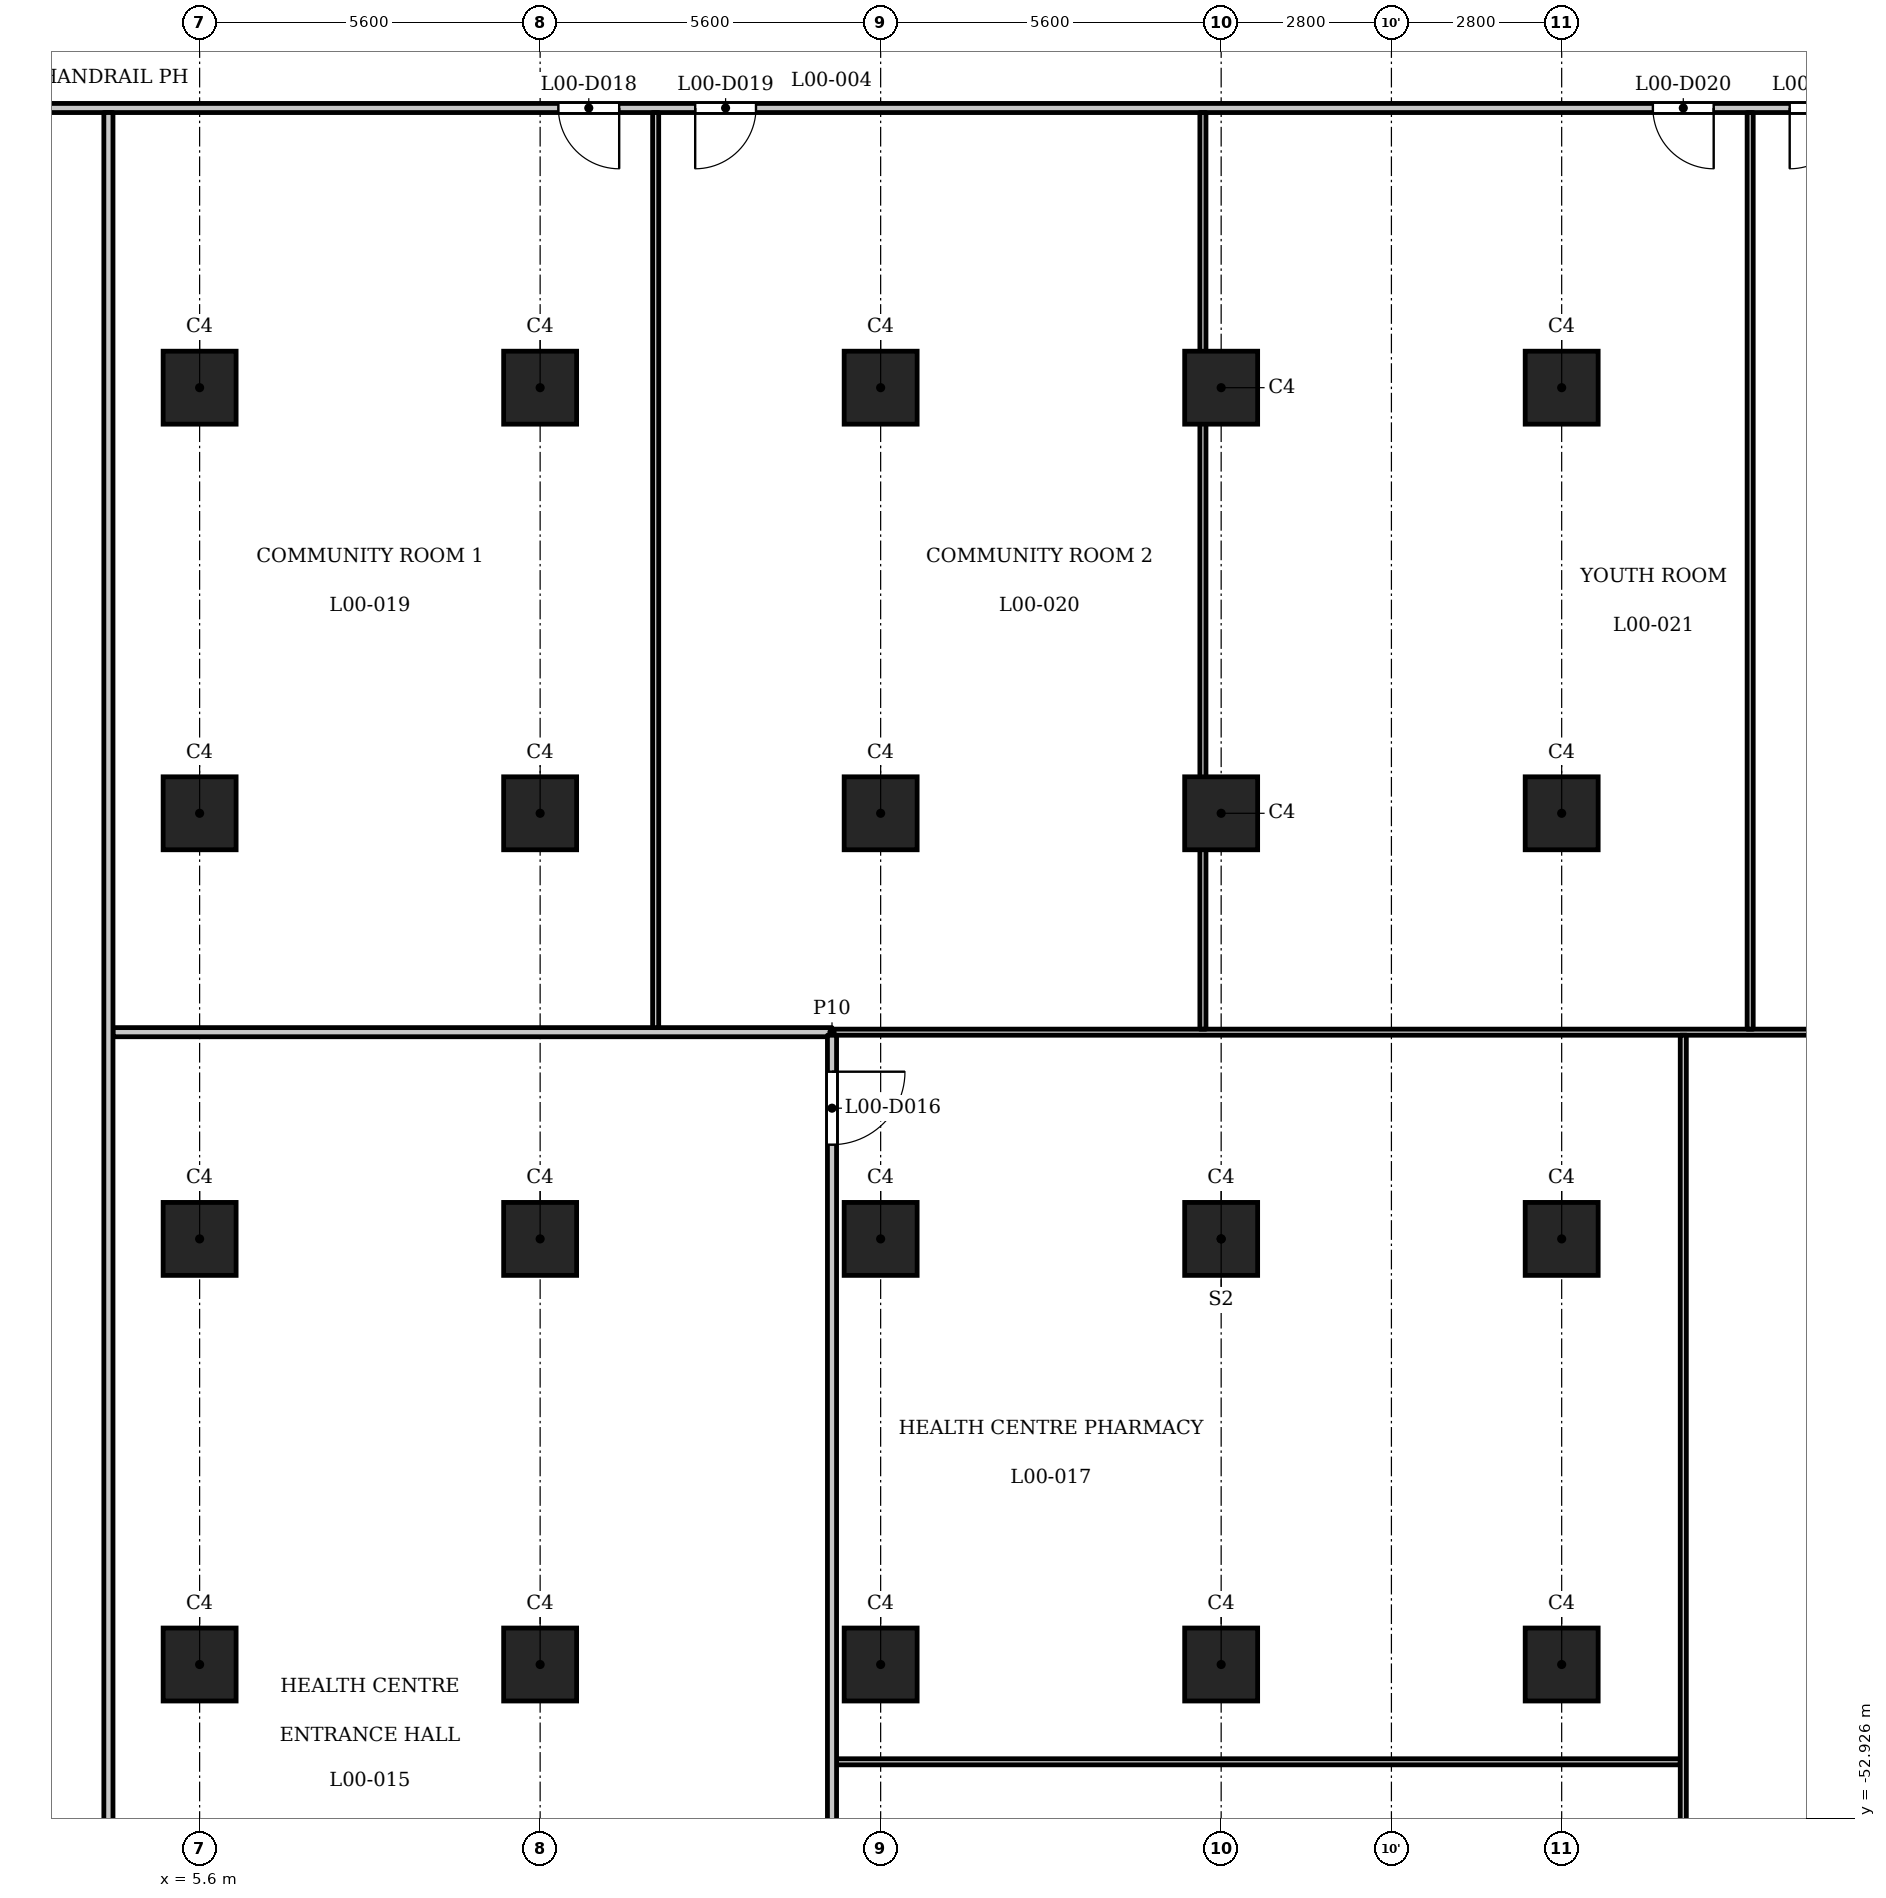
"""IFC4 building model, lengths in metres.
Left out: names, types, materials, properties, quantities, classifications, styles, units other than length and angle.
Written with IfcOpenShell. Run it as: python <this file> out.ifc"""

import sys

from ifc_helpers import new_model, si_unit, direction, frame, frame_2d, origin, origin_2d, place, context, subcontext, project, spatial, rectangle, circle, extrude, element, fill, save


model = new_model("IFC4")
c1 = context("Model", 3, precision=1e-05, world=origin(), true_north=direction((0.0, 1.0)))
c2 = subcontext(c1, "Body", "Model", "MODEL_VIEW")
j1 = project(units=[si_unit("LENGTHUNIT", "METRE"), si_unit("PLANEANGLEUNIT", "RADIAN")], contexts=[c1])
p1 = place(None, origin())
s1 = spatial("IfcSite", under=j1, at=p1, CompositionType="ELEMENT")
p2 = place(p1, origin())
s2 = spatial("IfcBuilding", under=s1, at=p2, CompositionType="ELEMENT")
p3 = place(p2, origin())
s3 = spatial("IfcBuildingStorey", under=s2, at=p3, CompositionType="ELEMENT", Elevation=0.0)
for number, where, z_axis, x_axis in (
    (1, (5.6, -29.4, 0.0), (0.0, 0.0, 1.0), (1.0, 0.0, 0.0)),
    (2, (11.2, -29.4, 0.0), (0.0, 0.0, 1.0), (1.0, 0.0, 0.0)),
    (3, (16.8, -29.4, 0.0), (0.0, 0.0, 1.0), (1.0, 0.0, 0.0)),
    (4, (22.4, -29.4, 0.0), (0.0, 0.0, 1.0), (1.0, 0.0, 0.0)),
    (5, (28.0, -29.4, 0.0), (0.0, 0.0, 1.0), (1.0, 0.0, 0.0)),
    (6, (5.6, -36.4, 0.0), (0.0, 0.0, 1.0), (1.0, 0.0, 0.0)),
    (7, (11.2, -36.4, 0.0), (0.0, 0.0, 1.0), (1.0, 0.0, 0.0)),
    (8, (16.8, -36.4, 0.0), (0.0, 0.0, 1.0), (1.0, 0.0, 0.0)),
    (9, (22.4, -36.4, 0.0), (0.0, 0.0, 1.0), (1.0, 0.0, 0.0)),
    (10, (28.0, -36.4, 0.0), (0.0, 0.0, 1.0), (1.0, 0.0, 0.0)),
    (11, (5.6, -43.4, 0.0), (0.0, 0.0, 1.0), (1.0, 0.0, 0.0)),
    (12, (11.2, -43.4, 0.0), (0.0, 0.0, 1.0), (1.0, 0.0, 0.0)),
    (13, (16.8, -43.4, 0.0), (0.0, 0.0, 1.0), (1.0, 0.0, 0.0)),
    (14, (22.4, -43.4, 0.0), (0.0, 0.0, 1.0), (1.0, 0.0, 0.0)),
    (15, (28.0, -43.4, 0.0), (0.0, 0.0, 1.0), (1.0, 0.0, 0.0)),
    (16, (5.6, -50.4, 0.0), (0.0, 0.0, 1.0), (1.0, 0.0, 0.0)),
    (17, (11.2, -50.4, 0.0), (0.0, 0.0, 1.0), (1.0, 0.0, 0.0)),
    (18, (16.8, -50.4, 0.0), (0.0, 0.0, 1.0), (1.0, 0.0, 0.0)),
    (19, (22.4, -50.4, 0.0), (0.0, 0.0, 1.0), (1.0, 0.0, 0.0)),
    (20, (28.0, -50.4, 0.0), (0.0, 0.0, 1.0), (1.0, 0.0, 0.0)),
):
    element("IfcColumn", number, at=place(p3, frame(where, z_axis=z_axis, x_axis=x_axis)), inside=s3, PredefinedType="COLUMN", context=c2, shape_type="SweptSolid", body=[
        extrude(circle(Radius=0.6, at=origin_2d()), origin(), (0.0, 0.0, 1.0), 6.5),
    ])
p4 = place(p3, frame((16.075, -52.0, 0.0), z_axis=(0.0, 0.0, 1.0), x_axis=(1.0, 0.0, 0.0)))
e21 = element("IfcWall", 21, at=p4, inside=s3, PredefinedType="PARTITIONING", context=c2, shape_type="SweptSolid", body=[
    extrude(rectangle(XDim=13.875, YDim=0.1, at=frame_2d((6.938, 0.0))), origin(), (0.0, 0.0, 1.0), 6.15),
])
p5 = place(p3, frame((16.0, -40.0, 0.0), z_axis=(0.0, 0.0, 1.0), x_axis=(1.0, 0.0, 0.0)))
e22 = element("IfcWall", 22, at=p5, inside=s3, PredefinedType="PARTITIONING", context=c2, shape_type="SweptSolid", body=[
    extrude(rectangle(XDim=28.618, YDim=0.1, at=frame_2d((14.309, 0.0))), origin(), (0.0, 0.0, 1.0), 6.15),
])
p6 = place(p3, frame((4.175, -40.0, 0.0), z_axis=(0.0, 0.0, 1.0), x_axis=(1.0, 0.0, 0.0)))
e23 = element("IfcWall", 23, at=p6, inside=s3, PredefinedType="PARTITIONING", context=c2, shape_type="SweptSolid", body=[
    extrude(rectangle(XDim=11.825, YDim=0.15, at=frame_2d((5.913, 0.0))), origin(), (0.0, 0.0, 1.0), 6.15),
])
p7 = place(p3, frame((2.05, -24.8, 0.0), z_axis=(0.0, 0.0, 1.0), x_axis=(1.0, 0.0, 0.0)))
e24 = element("IfcWall", 24, at=p7, inside=s3, PredefinedType="PARTITIONING", context=c2, shape_type="SweptSolid", body=[
    extrude(rectangle(XDim=34.95, YDim=0.15, at=frame_2d((17.475, 0.0))), origin(), (0.0, 0.0, 1.0), 6.15),
])
p8 = place(p7, frame((9.45, 0.0, 0.0)))
e25 = element("IfcOpeningElement", 25, at=p8, cuts=e24, PredefinedType="OPENING", context=c2, shape_type="SweptSolid", body=[
    extrude(rectangle(XDim=1.0, YDim=2.1, at=frame_2d((0.5, 1.05))), frame((0.0, 0.085, 0.0), z_axis=(0.0, -1.0, 0.0), x_axis=(1.0, 0.0, 0.0)), (0.0, 0.0, 1.0), 0.17),
])
p9 = place(p7, frame((11.7, 0.0, 0.0)))
e26 = element("IfcOpeningElement", 26, at=p9, cuts=e24, PredefinedType="OPENING", context=c2, shape_type="SweptSolid", body=[
    extrude(rectangle(XDim=1.0, YDim=2.1, at=frame_2d((0.5, 1.05))), frame((0.0, 0.085, 0.0), z_axis=(0.0, -1.0, 0.0), x_axis=(1.0, 0.0, 0.0)), (0.0, 0.0, 1.0), 0.17),
])
p10 = place(p7, frame((27.45, 0.0, 0.0)))
e27 = element("IfcOpeningElement", 27, at=p10, cuts=e24, PredefinedType="OPENING", context=c2, shape_type="SweptSolid", body=[
    extrude(rectangle(XDim=1.0, YDim=2.1, at=frame_2d((0.5, 1.05))), frame((0.0, 0.085, 0.0), z_axis=(0.0, -1.0, 0.0), x_axis=(1.0, 0.0, 0.0)), (0.0, 0.0, 1.0), 0.17),
])
p11 = place(p7, frame((29.7, 0.0, 0.0)))
e28 = element("IfcOpeningElement", 28, at=p11, cuts=e24, PredefinedType="OPENING", context=c2, shape_type="SweptSolid", body=[
    extrude(rectangle(XDim=1.0, YDim=2.1, at=frame_2d((0.5, 1.05))), frame((0.0, 0.085, 0.0), z_axis=(0.0, -1.0, 0.0), x_axis=(1.0, 0.0, 0.0)), (0.0, 0.0, 1.0), 0.17),
])
p12 = place(p3, frame((4.1, -64.08, 0.0), z_axis=(0.0, 0.0, 1.0), x_axis=(0.0, 1.0, 0.0)))
e29 = element("IfcWall", 29, at=p12, inside=s3, PredefinedType="PARTITIONING", context=c2, shape_type="SweptSolid", body=[
    extrude(rectangle(XDim=39.205, YDim=0.15, at=frame_2d((19.603, 0.0))), origin(), (0.0, 0.0, 1.0), 6.15),
])
p13 = place(p3, frame((13.1, -39.925, 0.0), z_axis=(0.0, 0.0, 1.0), x_axis=(0.0, 1.0, 0.0)))
e30 = element("IfcWall", 30, at=p13, inside=s3, PredefinedType="PARTITIONING", context=c2, shape_type="SweptSolid", body=[
    extrude(rectangle(XDim=15.05, YDim=0.1, at=frame_2d((7.525, 0.0))), origin(), (0.0, 0.0, 1.0), 6.15),
])
p14 = place(p3, frame((16.0, -64.08, 0.0), z_axis=(0.0, 0.0, 1.0), x_axis=(0.0, 1.0, 0.0)))
e31 = element("IfcWall", 31, at=p14, inside=s3, PredefinedType="PARTITIONING", context=c2, shape_type="SweptSolid", body=[
    extrude(rectangle(XDim=24.03, YDim=0.15, at=frame_2d((12.015, 0.0))), origin(), (0.0, 0.0, 1.0), 6.15),
])
p15 = place(p14, frame((0.42, 0.0, 0.0)))
e32 = element("IfcOpeningElement", 32, at=p15, cuts=e31, PredefinedType="OPENING", context=c2, shape_type="SweptSolid", body=[
    extrude(rectangle(XDim=1.8, YDim=2.1, at=frame_2d((0.9, 1.05))), frame((0.0, 0.085, 0.0), z_axis=(0.0, -1.0, 0.0), x_axis=(1.0, 0.0, 0.0)), (0.0, 0.0, 1.0), 0.17),
])
p16 = place(p14, frame((22.23, 0.0, 0.0)))
e33 = element("IfcOpeningElement", 33, at=p16, cuts=e31, PredefinedType="OPENING", context=c2, shape_type="SweptSolid", body=[
    extrude(rectangle(XDim=1.2, YDim=2.1, at=frame_2d((0.6, 1.05))), frame((0.0, 0.085, 0.0), z_axis=(0.0, -1.0, 0.0), x_axis=(1.0, 0.0, 0.0)), (0.0, 0.0, 1.0), 0.17),
])
p17 = place(p3, frame((22.1, -39.95, 0.0), z_axis=(0.0, 0.0, 1.0), x_axis=(0.0, 1.0, 0.0)))
e34 = element("IfcWall", 34, at=p17, inside=s3, PredefinedType="PARTITIONING", context=c2, shape_type="SweptSolid", body=[
    extrude(rectangle(XDim=15.075, YDim=0.1, at=frame_2d((7.538, 0.0))), origin(), (0.0, 0.0, 1.0), 6.15),
])
p18 = place(p3, frame((30.0, -64.218, 0.0), z_axis=(0.0, 0.0, 1.0), x_axis=(0.0, 1.0, 0.0)))
e35 = element("IfcWall", 35, at=p18, inside=s3, PredefinedType="PARTITIONING", context=c2, shape_type="SweptSolid", body=[
    extrude(rectangle(XDim=24.168, YDim=0.1, at=frame_2d((12.084, 0.0))), origin(), (0.0, 0.0, 1.0), 6.15),
])
p19 = place(p18, frame((0.558, 0.0, 0.0)))
e36 = element("IfcOpeningElement", 36, at=p19, cuts=e35, PredefinedType="OPENING", context=c2, shape_type="SweptSolid", body=[
    extrude(rectangle(XDim=1.8, YDim=2.1, at=frame_2d((0.9, 1.05))), frame((0.0, 0.06, 0.0), z_axis=(0.0, -1.0, 0.0), x_axis=(1.0, 0.0, 0.0)), (0.0, 0.0, 1.0), 0.12),
])
p20 = place(p3, frame((31.1, -39.95, 0.0), z_axis=(0.0, 0.0, 1.0), x_axis=(0.0, 1.0, 0.0)))
e37 = element("IfcWall", 37, at=p20, inside=s3, PredefinedType="PARTITIONING", context=c2, shape_type="SweptSolid", body=[
    extrude(rectangle(XDim=15.075, YDim=0.1, at=frame_2d((7.538, 0.0))), origin(), (0.0, 0.0, 1.0), 6.15),
])
p21 = place(p16, origin())
e38 = element("IfcDoor", 38, at=p21, inside=s3, OperationType="SINGLE_SWING_RIGHT", PredefinedType="DOOR", context=c2, shape_type="SweptSolid", body=[
    extrude(rectangle(XDim=1.2, YDim=2.1, at=frame_2d((0.6, 1.05))), frame((0.0, 0.025, 0.0), z_axis=(0.0, -1.0, 0.0), x_axis=(1.0, 0.0, 0.0)), (0.0, 0.0, 1.0), 0.05),
])
fill(e33, e38)
p22 = place(p8, origin())
e39 = element("IfcDoor", 39, at=p22, inside=s3, OperationType="SINGLE_SWING_RIGHT", PredefinedType="DOOR", context=c2, shape_type="SweptSolid", body=[
    extrude(rectangle(XDim=1.0, YDim=2.1, at=frame_2d((0.5, 1.05))), frame((0.0, 0.025, 0.0), z_axis=(0.0, -1.0, 0.0), x_axis=(1.0, 0.0, 0.0)), (0.0, 0.0, 1.0), 0.05),
])
fill(e25, e39)
p23 = place(p9, origin())
e40 = element("IfcDoor", 40, at=p23, inside=s3, OperationType="SINGLE_SWING_LEFT", PredefinedType="DOOR", context=c2, shape_type="SweptSolid", body=[
    extrude(rectangle(XDim=1.0, YDim=2.1, at=frame_2d((0.5, 1.05))), frame((0.0, 0.025, 0.0), z_axis=(0.0, -1.0, 0.0), x_axis=(1.0, 0.0, 0.0)), (0.0, 0.0, 1.0), 0.05),
])
fill(e26, e40)
p24 = place(p10, origin())
e41 = element("IfcDoor", 41, at=p24, inside=s3, OperationType="SINGLE_SWING_RIGHT", PredefinedType="DOOR", context=c2, shape_type="SweptSolid", body=[
    extrude(rectangle(XDim=1.0, YDim=2.1, at=frame_2d((0.5, 1.05))), frame((0.0, 0.025, 0.0), z_axis=(0.0, -1.0, 0.0), x_axis=(1.0, 0.0, 0.0)), (0.0, 0.0, 1.0), 0.05),
])
fill(e27, e41)
p25 = place(p11, origin())
e42 = element("IfcDoor", 42, at=p25, inside=s3, OperationType="SINGLE_SWING_LEFT", PredefinedType="DOOR", context=c2, shape_type="SweptSolid", body=[
    extrude(rectangle(XDim=1.0, YDim=2.1, at=frame_2d((0.5, 1.05))), frame((0.0, 0.025, 0.0), z_axis=(0.0, -1.0, 0.0), x_axis=(1.0, 0.0, 0.0)), (0.0, 0.0, 1.0), 0.05),
])
fill(e28, e42)
save(model, sys.argv[1])
